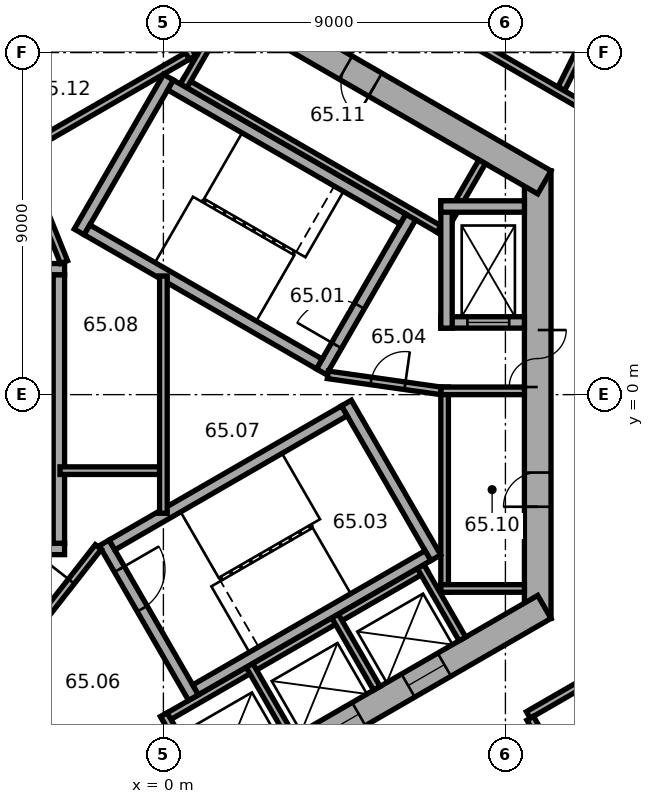
"""IFC4 building model, lengths in metres.
Left out: names, types, materials, properties, quantities, classifications, styles, units other than length and angle.
Written with IfcOpenShell. Run it as: python <this file> out.ifc"""

import sys

from ifc_helpers import new_model, si_unit, direction, frame, frame_2d, origin, place, context, subcontext, project, spatial, rectangle, extrude, element, fill, save


model = new_model("IFC4")
c1 = context("Model", 3, precision=1e-05, world=origin(), true_north=direction((0.0, 1.0)))
c2 = subcontext(c1, "Body", "Model", "MODEL_VIEW")
j1 = project(units=[si_unit("LENGTHUNIT", "METRE"), si_unit("PLANEANGLEUNIT", "RADIAN")], contexts=[c1])
p1 = place(None, origin())
s1 = spatial("IfcSite", under=j1, at=p1, CompositionType="ELEMENT")
p2 = place(p1, origin())
s2 = spatial("IfcBuilding", under=s1, at=p2, CompositionType="ELEMENT")
p3 = place(p2, frame((0.0, 0.0, 263.5)))
s3 = spatial("IfcBuildingStorey", under=s2, at=p3, CompositionType="ELEMENT", Elevation=263.5)
p4 = place(p3, frame((9.85, -5.889, 0.0), z_axis=(0.0, 0.0, 1.0), x_axis=(0.0, 1.0, 0.0)))
e1 = element("IfcWall", 1, at=p4, inside=s3, PredefinedType="SHEAR", context=c2, shape_type="SweptSolid", body=[
    extrude(rectangle(XDim=11.778, YDim=0.7, at=frame_2d((5.889, 0.0))), origin(), (0.0, 0.0, 1.0), 3.7),
])
p5 = place(p4, frame((6.089, 0.0, 0.0)))
e2 = element("IfcOpeningElement", 2, at=p5, cuts=e1, PredefinedType="OPENING", context=c2, shape_type="SweptSolid", body=[
    extrude(rectangle(XDim=1.5, YDim=2.1, at=frame_2d((0.75, 1.05))), frame((0.0, 0.36, 0.0), z_axis=(0.0, -1.0, 0.0), x_axis=(1.0, 0.0, 0.0)), (0.0, 0.0, 1.0), 0.72),
])
p6 = place(p4, frame((2.939, 0.0, 0.0)))
e3 = element("IfcOpeningElement", 3, at=p6, cuts=e1, PredefinedType="OPENING", context=c2, shape_type="SweptSolid", body=[
    extrude(rectangle(XDim=0.9, YDim=2.1, at=frame_2d((0.45, 1.05))), frame((0.0, 0.36, 0.0), z_axis=(0.0, -1.0, 0.0), x_axis=(1.0, 0.0, 0.0)), (0.0, 0.0, 1.0), 0.72),
])
p7 = place(p3, frame((10.025, 5.586, 0.0), z_axis=(0.0, 0.0, 1.0), x_axis=(-0.866026453023, 0.499998182661, 0.0)))
e4 = element("IfcWall", 4, at=p7, inside=s3, PredefinedType="SHEAR", context=c2, shape_type="SweptSolid", body=[
    extrude(rectangle(XDim=11.778, YDim=0.7, at=frame_2d((5.889, 0.0))), origin(), (0.0, 0.0, 1.0), 3.7),
])
p8 = place(p7, frame((5.139, 0.0, 0.0)))
e5 = element("IfcOpeningElement", 5, at=p8, cuts=e4, PredefinedType="OPENING", context=c2, shape_type="SweptSolid", body=[
    extrude(rectangle(XDim=0.9, YDim=2.1, at=frame_2d((0.45, 1.05))), frame((0.0, 0.36, 0.0), z_axis=(0.0, -1.0, 0.0), x_axis=(1.0, 0.0, 0.0)), (0.0, 0.0, 1.0), 0.72),
])
p9 = place(p3, frame((0.175, 11.475, 0.0), z_axis=(0.0, 0.0, 1.0), x_axis=(-0.866026453023, -0.499998182661, 0.0)))
e6 = element("IfcWall", 6, at=p9, inside=s3, PredefinedType="SHEAR", context=c2, shape_type="SweptSolid", body=[
    extrude(rectangle(XDim=11.778, YDim=0.7, at=frame_2d((5.889, 0.0))), origin(), (0.0, 0.0, 1.0), 3.7),
])
p10 = place(p9, frame((6.089, 0.0, 0.0)))
e7 = element("IfcOpeningElement", 7, at=p10, cuts=e6, PredefinedType="OPENING", context=c2, shape_type="SweptSolid", body=[
    extrude(rectangle(XDim=1.5, YDim=2.1, at=frame_2d((0.75, 1.05))), frame((0.0, 0.36, 0.0), z_axis=(0.0, -1.0, 0.0), x_axis=(1.0, 0.0, 0.0)), (0.0, 0.0, 1.0), 0.72),
])
p11 = place(p9, frame((2.939, 0.0, 0.0)))
e8 = element("IfcOpeningElement", 8, at=p11, cuts=e6, PredefinedType="OPENING", context=c2, shape_type="SweptSolid", body=[
    extrude(rectangle(XDim=0.9, YDim=2.1, at=frame_2d((0.45, 1.05))), frame((0.0, 0.36, 0.0), z_axis=(0.0, -1.0, 0.0), x_axis=(1.0, 0.0, 0.0)), (0.0, 0.0, 1.0), 0.72),
])
p12 = place(p3, frame((-10.025, -5.586, 0.0), z_axis=(0.0, 0.0, 1.0), x_axis=(0.866026453023, -0.499998182661, 0.0)))
e9 = element("IfcWall", 9, at=p12, inside=s3, PredefinedType="SHEAR", context=c2, shape_type="SweptSolid", body=[
    extrude(rectangle(XDim=11.778, YDim=0.7, at=frame_2d((5.889, 0.0))), origin(), (0.0, 0.0, 1.0), 3.7),
])
p13 = place(p12, frame((6.089, 0.0, 0.0)))
e10 = element("IfcOpeningElement", 10, at=p13, cuts=e9, PredefinedType="OPENING", context=c2, shape_type="SweptSolid", body=[
    extrude(rectangle(XDim=1.5, YDim=2.1, at=frame_2d((0.75, 1.05))), frame((0.0, 0.36, 0.0), z_axis=(0.0, -1.0, 0.0), x_axis=(1.0, 0.0, 0.0)), (0.0, 0.0, 1.0), 0.72),
])
p14 = place(p12, frame((1.539, 0.0, 0.0)))
e11 = element("IfcOpeningElement", 11, at=p14, cuts=e9, PredefinedType="OPENING", context=c2, shape_type="SweptSolid", body=[
    extrude(rectangle(XDim=1.1, YDim=2.1, at=frame_2d((0.55, 1.05))), frame((0.0, 0.36, 0.0), z_axis=(0.0, -1.0, 0.0), x_axis=(1.0, 0.0, 0.0)), (0.0, 0.0, 1.0), 0.72),
])
p15 = place(p12, frame((4.139, 0.0, 0.0)))
e12 = element("IfcOpeningElement", 12, at=p15, cuts=e9, PredefinedType="OPENING", context=c2, shape_type="SweptSolid", body=[
    extrude(rectangle(XDim=1.1, YDim=2.1, at=frame_2d((0.55, 1.05))), frame((0.0, 0.36, 0.0), z_axis=(0.0, -1.0, 0.0), x_axis=(1.0, 0.0, 0.0)), (0.0, 0.0, 1.0), 0.72),
])
p16 = place(p3, frame((-0.175, -11.475, 0.0), z_axis=(0.0, 0.0, 1.0), x_axis=(0.866026453023, 0.499998182661, 0.0)))
e13 = element("IfcWall", 13, at=p16, inside=s3, PredefinedType="SHEAR", context=c2, shape_type="SweptSolid", body=[
    extrude(rectangle(XDim=11.778, YDim=0.7, at=frame_2d((5.889, 0.0))), origin(), (0.0, 0.0, 1.0), 3.7),
])
p17 = place(p16, frame((2.439, 0.0, 0.0)))
e14 = element("IfcOpeningElement", 14, at=p17, cuts=e13, PredefinedType="OPENING", context=c2, shape_type="SweptSolid", body=[
    extrude(rectangle(XDim=1.1, YDim=2.1, at=frame_2d((0.55, 1.05))), frame((0.0, 0.36, 0.0), z_axis=(0.0, -1.0, 0.0), x_axis=(1.0, 0.0, 0.0)), (0.0, 0.0, 1.0), 0.72),
])
p18 = place(p16, frame((5.039, 0.0, 0.0)))
e15 = element("IfcOpeningElement", 15, at=p18, cuts=e13, PredefinedType="OPENING", context=c2, shape_type="SweptSolid", body=[
    extrude(rectangle(XDim=1.1, YDim=2.1, at=frame_2d((0.55, 1.05))), frame((0.0, 0.36, 0.0), z_axis=(0.0, -1.0, 0.0), x_axis=(1.0, 0.0, 0.0)), (0.0, 0.0, 1.0), 0.72),
])
p19 = place(p16, frame((7.639, 0.0, 0.0)))
e16 = element("IfcOpeningElement", 16, at=p19, cuts=e13, PredefinedType="OPENING", context=c2, shape_type="SweptSolid", body=[
    extrude(rectangle(XDim=1.1, YDim=2.1, at=frame_2d((0.55, 1.05))), frame((0.0, 0.36, 0.0), z_axis=(0.0, -1.0, 0.0), x_axis=(1.0, 0.0, 0.0)), (0.0, 0.0, 1.0), 0.72),
])
p20 = place(p3, frame((7.4, -5.2, 0.0), z_axis=(0.0, 0.0, 1.0), x_axis=(0.0, 1.0, 0.0)))
e17 = element("IfcWall", 17, at=p20, inside=s3, PredefinedType="PARTITIONING", context=c2, shape_type="SweptSolid", body=[
    extrude(rectangle(XDim=5.4, YDim=0.2, at=frame_2d((2.7, 0.0))), origin(), (0.0, 0.0, 1.0), 3.42),
])
for number, where, z_axis, x_axis in (
    (18, (7.3, -5.1, 0.0), (0.0, 0.0, 1.0), (1.0, 0.0, 0.0)),
    (19, (7.3, 0.1, 0.0), (0.0, 0.0, 1.0), (1.0, 0.0, 0.0)),
):
    element("IfcWall", number, at=place(p3, frame(where, z_axis=z_axis, x_axis=x_axis)), inside=s3, PredefinedType="PARTITIONING", context=c2, shape_type="SweptSolid", body=[
        extrude(rectangle(XDim=2.2, YDim=0.2, at=frame_2d((1.1, 0.0))), origin(), (0.0, 0.0, 1.0), 3.42),
    ])
p21 = place(p3, frame((7.424, 4.259, 0.0), z_axis=(0.0, 0.0, 1.0), x_axis=(-0.866026010844, 0.49999894854, 0.0)))
e20 = element("IfcWall", 20, at=p21, inside=s3, PredefinedType="PARTITIONING", context=c2, shape_type="SweptSolid", body=[
    extrude(rectangle(XDim=8.0, YDim=0.2, at=frame_2d((4.0, 0.0))), origin(), (0.0, 0.0, 1.0), 3.42),
])
for number, where, z_axis, x_axis in (
    (21, (7.287, 4.222, 0.0), (0.0, 0.0, 1.0), (0.5, 0.866, 0.0)),
    (22, (0.532, 8.122, 0.0), (0.0, 0.0, 1.0), (0.5, 0.866, 0.0)),
):
    element("IfcWall", number, at=place(p3, frame(where, z_axis=z_axis, x_axis=x_axis)), inside=s3, PredefinedType="PARTITIONING", context=c2, shape_type="SweptSolid", body=[
        extrude(rectangle(XDim=2.2, YDim=0.2, at=frame_2d((1.1, 0.0))), origin(), (0.0, 0.0, 1.0), 3.42),
    ])
p22 = place(p3, frame((0.803, 9.009, 0.0), z_axis=(0.0, 0.0, 1.0), x_axis=(-0.866028230842, -0.499995103361, 0.0)))
e23 = element("IfcWall", 23, at=p22, inside=s3, PredefinedType="PARTITIONING", context=c2, shape_type="SweptSolid", body=[
    extrude(rectangle(XDim=5.4, YDim=0.2, at=frame_2d((2.7, 0.0))), origin(), (0.0, 0.0, 1.0), 3.42),
])
p23 = place(p3, frame((0.767, 8.872, 0.0), z_axis=(0.0, 0.0, 1.0), x_axis=(-0.499994660107, 0.866028486751, 0.0)))
e24 = element("IfcWall", 24, at=p23, inside=s3, PredefinedType="PARTITIONING", context=c2, shape_type="SweptSolid", body=[
    extrude(rectangle(XDim=2.2, YDim=0.2, at=frame_2d((1.1, 0.0))), origin(), (0.0, 0.0, 1.0), 3.42),
])
p24 = place(p3, frame((-0.024, -8.559, 0.0), z_axis=(0.0, 0.0, 1.0), x_axis=(0.866026010844, 0.49999894854, 0.0)))
e25 = element("IfcWall", 25, at=p24, inside=s3, PredefinedType="PARTITIONING", context=c2, shape_type="SweptSolid", body=[
    extrude(rectangle(XDim=8.0, YDim=0.2, at=frame_2d((4.0, 0.0))), origin(), (0.0, 0.0, 1.0), 3.42),
])
for number, where, z_axis, x_axis in (
    (26, (0.013, -8.422, 0.0), (0.0, 0.0, 1.0), (0.5, -0.866, 0.0)),
    (27, (2.264, -7.122, 0.0), (0.0, 0.0, 1.0), (0.5, -0.866, 0.0)),
    (28, (4.516, -5.822, 0.0), (0.0, 0.0, 1.0), (0.5, -0.866, 0.0)),
    (29, (6.768, -4.522, 0.0), (0.0, 0.0, 1.0), (0.5, -0.866, 0.0)),
):
    element("IfcWall", number, at=place(p3, frame(where, z_axis=z_axis, x_axis=x_axis)), inside=s3, PredefinedType="PARTITIONING", context=c2, shape_type="SweptSolid", body=[
        extrude(rectangle(XDim=2.2, YDim=0.2, at=frame_2d((1.1, 0.0))), origin(), (0.0, 0.0, 1.0), 3.42),
    ])
p25 = place(p3, frame((4.158, 0.602, 0.0), z_axis=(0.0, 0.0, 1.0), x_axis=(0.499977259774, 0.866038532462, 0.0)))
e30 = element("IfcWall", 30, at=p25, inside=s3, PredefinedType="SHEAR", context=c2, shape_type="SweptSolid", body=[
    extrude(rectangle(XDim=4.7, YDim=0.3, at=frame_2d((2.35, 0.0))), origin(), (0.0, 0.0, 1.0), 3.42),
])
p26 = place(p25, frame((0.8, 0.0, 0.0)))
e31 = element("IfcOpeningElement", 31, at=p26, cuts=e30, PredefinedType="OPENING", context=c2, shape_type="SweptSolid", body=[
    extrude(rectangle(XDim=1.2, YDim=2.1, at=frame_2d((0.6, 1.05))), frame((0.0, 0.16, 0.0), z_axis=(0.0, -1.0, 0.0), x_axis=(1.0, 0.0, 0.0)), (0.0, 0.0, 1.0), 0.32),
])
p27 = place(p3, frame((-2.216, 4.282, 0.0), z_axis=(0.0, 0.0, 1.0), x_axis=(0.499977259774, 0.866038532462, 0.0)))
e32 = element("IfcWall", 32, at=p27, inside=s3, PredefinedType="SHEAR", context=c2, shape_type="SweptSolid", body=[
    extrude(rectangle(XDim=4.7, YDim=0.3, at=frame_2d((2.35, 0.0))), origin(), (0.0, 0.0, 1.0), 3.42),
])
for number, where, z_axis, x_axis in (
    (33, (4.103, 0.807, 0.0), (0.0, 0.0, 1.0), (-0.866, 0.5, 0.0)),
    (34, (6.303, 4.617, 0.0), (0.0, 0.0, 1.0), (-0.866, 0.5, 0.0)),
):
    element("IfcWall", number, at=place(p3, frame(where, z_axis=z_axis, x_axis=x_axis)), inside=s3, PredefinedType="SHEAR", context=c2, shape_type="SweptSolid", body=[
        extrude(rectangle(XDim=7.06, YDim=0.3, at=frame_2d((3.53, 0.0))), origin(), (0.0, 0.0, 1.0), 3.42),
    ])
p28 = place(p3, frame((-2.6, 3.3, 0.0), z_axis=(0.0, 0.0, 1.0), x_axis=(-1.0, 0.0, 0.0)))
e35 = element("IfcWall", 35, at=p28, inside=s3, PredefinedType="SHEAR", context=c2, shape_type="SweptSolid", body=[
    extrude(rectangle(XDim=4.7, YDim=0.3, at=frame_2d((2.35, 0.0))), origin(), (0.0, 0.0, 1.0), 3.42),
])
p29 = place(p28, frame((0.8, 0.0, 0.0)))
e36 = element("IfcOpeningElement", 36, at=p29, cuts=e35, PredefinedType="OPENING", context=c2, shape_type="SweptSolid", body=[
    extrude(rectangle(XDim=1.2, YDim=2.1, at=frame_2d((0.6, 1.05))), frame((0.0, 0.16, 0.0), z_axis=(0.0, -1.0, 0.0), x_axis=(1.0, 0.0, 0.0)), (0.0, 0.0, 1.0), 0.32),
])
p30 = place(p3, frame((-2.6, -4.06, 0.0), z_axis=(0.0, 0.0, 1.0), x_axis=(-1.0, 0.0, 0.0)))
e37 = element("IfcWall", 37, at=p30, inside=s3, PredefinedType="SHEAR", context=c2, shape_type="SweptSolid", body=[
    extrude(rectangle(XDim=4.7, YDim=0.3, at=frame_2d((2.35, 0.0))), origin(), (0.0, 0.0, 1.0), 3.42),
])
p31 = place(p3, frame((-2.75, 3.15, 0.0), z_axis=(0.0, 0.0, 1.0), x_axis=(0.0, -1.0, 0.0)))
e38 = element("IfcWall", 38, at=p31, inside=s3, PredefinedType="SHEAR", context=c2, shape_type="SweptSolid", body=[
    extrude(rectangle(XDim=7.06, YDim=0.3, at=frame_2d((3.53, 0.0))), origin(), (0.0, 0.0, 1.0), 3.42),
])
p32 = place(p3, frame((-1.558, -3.902, 0.0), z_axis=(0.0, 0.0, 1.0), x_axis=(0.499977259774, -0.866038532462, 0.0)))
e39 = element("IfcWall", 39, at=p32, inside=s3, PredefinedType="SHEAR", context=c2, shape_type="SweptSolid", body=[
    extrude(rectangle(XDim=4.7, YDim=0.3, at=frame_2d((2.35, 0.0))), origin(), (0.0, 0.0, 1.0), 3.42),
])
p33 = place(p32, frame((0.8, 0.0, 0.0)))
e40 = element("IfcOpeningElement", 40, at=p33, cuts=e39, PredefinedType="OPENING", context=c2, shape_type="SweptSolid", body=[
    extrude(rectangle(XDim=1.2, YDim=2.1, at=frame_2d((0.6, 1.05))), frame((0.0, 0.16, 0.0), z_axis=(0.0, -1.0, 0.0), x_axis=(1.0, 0.0, 0.0)), (0.0, 0.0, 1.0), 0.32),
])
p34 = place(p3, frame((4.816, -0.222, 0.0), z_axis=(0.0, 0.0, 1.0), x_axis=(0.499977259774, -0.866038532462, 0.0)))
e41 = element("IfcWall", 41, at=p34, inside=s3, PredefinedType="SHEAR", context=c2, shape_type="SweptSolid", body=[
    extrude(rectangle(XDim=4.7, YDim=0.3, at=frame_2d((2.35, 0.0))), origin(), (0.0, 0.0, 1.0), 3.42),
])
for number, where, z_axis, x_axis in (
    (42, (-1.353, -3.957, 0.0), (0.0, 0.0, 1.0), (0.866, 0.5, 0.0)),
    (43, (0.847, -7.767, 0.0), (0.0, 0.0, 1.0), (0.866, 0.5, 0.0)),
):
    element("IfcWall", number, at=place(p3, frame(where, z_axis=z_axis, x_axis=x_axis)), inside=s3, PredefinedType="SHEAR", context=c2, shape_type="SweptSolid", body=[
        extrude(rectangle(XDim=7.06, YDim=0.3, at=frame_2d((3.53, 0.0))), origin(), (0.0, 0.0, 1.0), 3.42),
    ])
p35 = place(p3, frame((7.3, 1.9, 0.0), z_axis=(0.0, 0.0, 1.0), x_axis=(1.0, 0.0, 0.0)))
e44 = element("IfcWall", 44, at=p35, inside=s3, PredefinedType="SHEAR", context=c2, shape_type="SweptSolid", body=[
    extrude(rectangle(XDim=2.2, YDim=0.3, at=frame_2d((1.1, 0.0))), origin(), (0.0, 0.0, 1.0), 3.42),
])
p36 = place(p35, frame((0.7, 0.0, 0.0)))
e45 = element("IfcOpeningElement", 45, at=p36, cuts=e44, PredefinedType="OPENING", context=c2, shape_type="SweptSolid", body=[
    extrude(rectangle(XDim=1.1, YDim=2.1, at=frame_2d((0.55, 1.05))), frame((0.0, 0.16, 0.0), z_axis=(0.0, -1.0, 0.0), x_axis=(1.0, 0.0, 0.0)), (0.0, 0.0, 1.0), 0.32),
])
p37 = place(p3, frame((7.45, 1.75, 0.0), z_axis=(0.0, 0.0, 1.0), x_axis=(0.0, 1.0, 0.0)))
e46 = element("IfcWall", 46, at=p37, inside=s3, PredefinedType="SHEAR", context=c2, shape_type="SweptSolid", body=[
    extrude(rectangle(XDim=3.35, YDim=0.3, at=frame_2d((1.675, 0.0))), origin(), (0.0, 0.0, 1.0), 3.42),
])
p38 = place(p3, frame((7.3, 4.95, 0.0), z_axis=(0.0, 0.0, 1.0), x_axis=(1.0, 0.0, 0.0)))
e47 = element("IfcWall", 47, at=p38, inside=s3, PredefinedType="SHEAR", context=c2, shape_type="SweptSolid", body=[
    extrude(rectangle(XDim=2.2, YDim=0.3, at=frame_2d((1.1, 0.0))), origin(), (0.0, 0.0, 1.0), 3.42),
])
p39 = place(p3, frame((4.327, 0.521, 0.0), z_axis=(0.0, 0.0, 1.0), x_axis=(0.990124376366, -0.14019172346, 0.0)))
e48 = element("IfcWall", 48, at=p39, inside=s3, PredefinedType="PARTITIONING", context=c2, shape_type="SweptSolid", body=[
    extrude(rectangle(XDim=3.002, YDim=0.2, at=frame_2d((1.501, 0.0))), origin(), (0.0, 0.0, 1.0), 3.42),
])
p40 = place(p39, frame((1.15, 0.0, 0.0)))
e49 = element("IfcOpeningElement", 49, at=p40, cuts=e48, PredefinedType="OPENING", context=c2, shape_type="SweptSolid", body=[
    extrude(rectangle(XDim=0.9, YDim=2.1, at=frame_2d((0.45, 1.05))), frame((0.0, 0.11, 0.0), z_axis=(0.0, -1.0, 0.0), x_axis=(1.0, 0.0, 0.0)), (0.0, 0.0, 1.0), 0.22),
])
p41 = place(p3, frame((-2.615, 3.487, 0.0), z_axis=(0.0, 0.0, 1.0), x_axis=(-0.373576831041, 0.92759924068, 0.0)))
e50 = element("IfcWall", 50, at=p41, inside=s3, PredefinedType="PARTITIONING", context=c2, shape_type="SweptSolid", body=[
    extrude(rectangle(XDim=3.002, YDim=0.2, at=frame_2d((1.501, 0.0))), origin(), (0.0, 0.0, 1.0), 3.42),
])
p42 = place(p41, frame((1.15, 0.0, 0.0)))
e51 = element("IfcOpeningElement", 51, at=p42, cuts=e50, PredefinedType="OPENING", context=c2, shape_type="SweptSolid", body=[
    extrude(rectangle(XDim=0.9, YDim=2.1, at=frame_2d((0.45, 1.05))), frame((0.0, 0.11, 0.0), z_axis=(0.0, -1.0, 0.0), x_axis=(1.0, 0.0, 0.0)), (0.0, 0.0, 1.0), 0.22),
])
p43 = place(p3, frame((-1.712, -4.008, 0.0), z_axis=(0.0, 0.0, 1.0), x_axis=(-0.616549420702, -0.787316208287, 0.0)))
e52 = element("IfcWall", 52, at=p43, inside=s3, PredefinedType="PARTITIONING", context=c2, shape_type="SweptSolid", body=[
    extrude(rectangle(XDim=3.002, YDim=0.2, at=frame_2d((1.501, 0.0))), origin(), (0.0, 0.0, 1.0), 3.42),
])
p44 = place(p43, frame((1.15, 0.0, 0.0)))
e53 = element("IfcOpeningElement", 53, at=p44, cuts=e52, PredefinedType="OPENING", context=c2, shape_type="SweptSolid", body=[
    extrude(rectangle(XDim=0.9, YDim=2.1, at=frame_2d((0.45, 1.05))), frame((0.0, 0.11, 0.0), z_axis=(0.0, -1.0, 0.0), x_axis=(1.0, 0.0, 0.0)), (0.0, 0.0, 1.0), 0.22),
])
p45 = place(p3, frame((-2.72, -2.0, 0.0), z_axis=(0.0, 0.0, 1.0), x_axis=(1.0, 0.0, 0.0)))
e54 = element("IfcWall", 54, at=p45, inside=s3, PredefinedType="PARTITIONING", context=c2, shape_type="SweptSolid", body=[
    extrude(rectangle(XDim=2.62, YDim=0.2, at=frame_2d((1.31, 0.0))), origin(), (0.0, 0.0, 1.0), 3.42),
])
p46 = place(p3, frame((0.0, -3.122, 0.0), z_axis=(0.0, 0.0, 1.0), x_axis=(0.0, 1.0, 0.0)))
e55 = element("IfcWall", 55, at=p46, inside=s3, PredefinedType="PARTITIONING", context=c2, shape_type="SweptSolid", body=[
    extrude(rectangle(XDim=6.245, YDim=0.2, at=frame_2d((3.122, 0.0))), origin(), (0.0, 0.0, 1.0), 3.42),
])
p47 = place(p3, frame((9.602, -8.428, 0.0), z_axis=(0.0, 0.0, 1.0), x_axis=(0.865999114786, 0.500045531117, 0.0)))
e56 = element("IfcWall", 56, at=p47, inside=s3, PredefinedType="PARTITIONING", context=c2, shape_type="SweptSolid", body=[
    extrude(rectangle(XDim=1.788, YDim=0.2, at=frame_2d((0.894, 0.0))), origin(), (0.0, 0.0, 1.0), 3.42),
])
p48 = place(p3, frame((10.152, -9.382, 0.0), z_axis=(0.0, 0.0, 1.0), x_axis=(-0.499968756647, 0.866043441391, 0.0)))
e57 = element("IfcWall", 57, at=p48, inside=s3, PredefinedType="PARTITIONING", context=c2, shape_type="SweptSolid", body=[
    extrude(rectangle(XDim=1.001, YDim=0.2, at=frame_2d((0.5, 0.0))), origin(), (0.0, 0.0, 1.0), 3.42),
])
p49 = place(p3, frame((11.15, 7.534, 0.0), z_axis=(0.0, 0.0, 1.0), x_axis=(-0.866026603062, 0.499997922785, 0.0)))
e58 = element("IfcWall", 58, at=p49, inside=s3, PredefinedType="PARTITIONING", context=c2, shape_type="SweptSolid", body=[
    extrude(rectangle(XDim=11.738, YDim=0.2, at=frame_2d((5.869, 0.0))), origin(), (0.0, 0.0, 1.0), 3.42),
])
p50 = place(p49, frame((5.345, 0.0, 0.0)))
e59 = element("IfcOpeningElement", 59, at=p50, cuts=e58, PredefinedType="OPENING", context=c2, shape_type="SweptSolid", body=[
    extrude(rectangle(XDim=1.0, YDim=2.1, at=frame_2d((0.5, 1.05))), frame((0.0, 0.11, 0.0), z_axis=(0.0, -1.0, 0.0), x_axis=(1.0, 0.0, 0.0)), (0.0, 0.0, 1.0), 0.22),
])
p51 = place(p3, frame((13.405, 13.933, 0.0), z_axis=(0.0, 0.0, 1.0), x_axis=(-0.446187838644, -0.894939334618, 0.0)))
e60 = element("IfcWall", 60, at=p51, inside=s3, PredefinedType="PARTITIONING", context=c2, shape_type="SweptSolid", body=[
    extrude(rectangle(XDim=6.571, YDim=0.2, at=frame_2d((3.286, 0.0))), origin(), (0.0, 0.0, 1.0), 3.42),
])
p52 = place(p5, origin())
e61 = element("IfcDoor", 61, at=p52, inside=s3, OperationType="DOUBLE_DOOR_SINGLE_SWING", PredefinedType="DOOR", context=c2, shape_type="SweptSolid", body=[
    extrude(rectangle(XDim=1.5, YDim=2.1, at=frame_2d((0.75, 1.05))), frame((0.0, 0.025, 0.0), z_axis=(0.0, -1.0, 0.0), x_axis=(1.0, 0.0, 0.0)), (0.0, 0.0, 1.0), 0.05),
])
fill(e2, e61)
p53 = place(p26, origin())
e62 = element("IfcDoor", 62, at=p53, inside=s3, OperationType="SINGLE_SWING_RIGHT", PredefinedType="DOOR", context=c2, shape_type="SweptSolid", body=[
    extrude(rectangle(XDim=1.2, YDim=2.1, at=frame_2d((0.6, 1.05))), frame((0.0, 0.025, 0.0), z_axis=(0.0, -1.0, 0.0), x_axis=(1.0, 0.0, 0.0)), (0.0, 0.0, 1.0), 0.05),
])
fill(e31, e62)
p54 = place(p33, origin())
e63 = element("IfcDoor", 63, at=p54, inside=s3, OperationType="SINGLE_SWING_RIGHT", PredefinedType="DOOR", context=c2, shape_type="SweptSolid", body=[
    extrude(rectangle(XDim=1.2, YDim=2.1, at=frame_2d((0.6, 1.05))), frame((0.0, 0.025, 0.0), z_axis=(0.0, -1.0, 0.0), x_axis=(1.0, 0.0, 0.0)), (0.0, 0.0, 1.0), 0.05),
])
fill(e40, e63)
p55 = place(p40, origin())
e64 = element("IfcDoor", 64, at=p55, inside=s3, OperationType="SINGLE_SWING_LEFT", PredefinedType="DOOR", context=c2, shape_type="SweptSolid", body=[
    extrude(rectangle(XDim=0.9, YDim=2.1, at=frame_2d((0.45, 1.05))), frame((0.0, 0.025, 0.0), z_axis=(0.0, -1.0, 0.0), x_axis=(1.0, 0.0, 0.0)), (0.0, 0.0, 1.0), 0.05),
])
fill(e49, e64)
p56 = place(p44, origin())
e65 = element("IfcDoor", 65, at=p56, inside=s3, OperationType="SINGLE_SWING_LEFT", PredefinedType="DOOR", context=c2, shape_type="SweptSolid", body=[
    extrude(rectangle(XDim=0.9, YDim=2.1, at=frame_2d((0.45, 1.05))), frame((0.0, 0.025, 0.0), z_axis=(0.0, -1.0, 0.0), x_axis=(1.0, 0.0, 0.0)), (0.0, 0.0, 1.0), 0.05),
])
fill(e53, e65)
p57 = place(p6, origin())
e66 = element("IfcDoor", 66, at=p57, inside=s3, OperationType="SINGLE_SWING_LEFT", PredefinedType="DOOR", context=c2, shape_type="SweptSolid", body=[
    extrude(rectangle(XDim=0.9, YDim=2.1, at=frame_2d((0.45, 1.05))), frame((0.0, 0.025, 0.0), z_axis=(0.0, -1.0, 0.0), x_axis=(1.0, 0.0, 0.0)), (0.0, 0.0, 1.0), 0.05),
])
fill(e3, e66)
p58 = place(p8, origin())
e67 = element("IfcDoor", 67, at=p58, inside=s3, OperationType="SINGLE_SWING_LEFT", PredefinedType="DOOR", context=c2, shape_type="SweptSolid", body=[
    extrude(rectangle(XDim=0.9, YDim=2.1, at=frame_2d((0.45, 1.05))), frame((0.0, 0.025, 0.0), z_axis=(0.0, -1.0, 0.0), x_axis=(1.0, 0.0, 0.0)), (0.0, 0.0, 1.0), 0.05),
])
fill(e5, e67)
p59 = place(p36, origin())
e68 = element("IfcDoor", 68, at=p59, inside=s3, OperationType="DOUBLE_DOOR_SLIDING", PredefinedType="DOOR", context=c2, shape_type="SweptSolid", body=[
    extrude(rectangle(XDim=1.1, YDim=2.1, at=frame_2d((0.55, 1.05))), frame((0.0, 0.025, 0.0), z_axis=(0.0, -1.0, 0.0), x_axis=(1.0, 0.0, 0.0)), (0.0, 0.0, 1.0), 0.05),
])
fill(e45, e68)
p60 = place(p18, origin())
e69 = element("IfcDoor", 69, at=p60, inside=s3, OperationType="DOUBLE_DOOR_SLIDING", PredefinedType="DOOR", context=c2, shape_type="SweptSolid", body=[
    extrude(rectangle(XDim=1.1, YDim=2.1, at=frame_2d((0.55, 1.05))), frame((0.0, 0.025, 0.0), z_axis=(0.0, -1.0, 0.0), x_axis=(1.0, 0.0, 0.0)), (0.0, 0.0, 1.0), 0.05),
])
fill(e15, e69)
p61 = place(p19, origin())
e70 = element("IfcDoor", 70, at=p61, inside=s3, OperationType="DOUBLE_DOOR_SLIDING", PredefinedType="DOOR", context=c2, shape_type="SweptSolid", body=[
    extrude(rectangle(XDim=1.1, YDim=2.1, at=frame_2d((0.55, 1.05))), frame((0.0, 0.025, 0.0), z_axis=(0.0, -1.0, 0.0), x_axis=(1.0, 0.0, 0.0)), (0.0, 0.0, 1.0), 0.05),
])
fill(e16, e70)
save(model, sys.argv[1])
